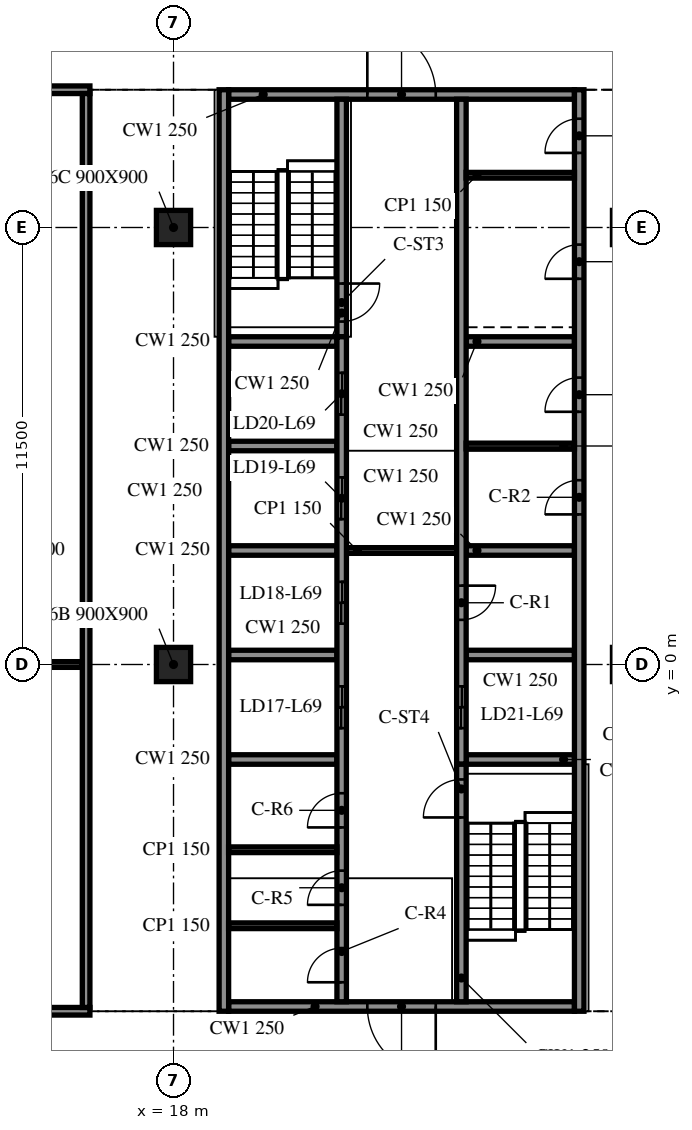
"""IFC4 building model, lengths in metres.
Left out: names, types, materials, properties, quantities, classifications, styles, units other than length and angle.
Written with IfcOpenShell. Run it as: python <this file> out.ifc"""

import sys

from ifc_helpers import new_model, si_unit, direction, frame, frame_2d, origin, origin_2d, place, context, subcontext, project, spatial, rectangle, extrude, element, fill, save


model = new_model("IFC4")
c1 = context("Model", 3, precision=1e-05, world=origin(), true_north=direction((0.0, 1.0)))
c2 = subcontext(c1, "Body", "Model", "MODEL_VIEW")
j1 = project(units=[si_unit("LENGTHUNIT", "METRE"), si_unit("PLANEANGLEUNIT", "RADIAN")], contexts=[c1])
p1 = place(None, origin())
s1 = spatial("IfcSite", under=j1, at=p1, CompositionType="ELEMENT")
p2 = place(p1, origin())
s2 = spatial("IfcBuilding", under=s1, at=p2, CompositionType="ELEMENT")
p3 = place(p2, frame((0.0, 0.0, 282.3)))
s3 = spatial("IfcBuildingStorey", under=s2, at=p3, CompositionType="ELEMENT", Elevation=282.3)
for number, where, z_axis, x_axis in (
    (1, (18.0, 0.0, -0.34), (0.0, 0.0, 1.0), (1.0, 0.0, 0.0)),
    (2, (18.0, 11.5, -0.34), (0.0, 0.0, 1.0), (1.0, 0.0, 0.0)),
):
    element("IfcColumn", number, at=place(p3, frame(where, z_axis=z_axis, x_axis=x_axis)), inside=s3, PredefinedType="COLUMN", context=c2, shape_type="SweptSolid", body=[
        extrude(rectangle(XDim=0.9, YDim=0.9, at=origin_2d()), origin(), (0.0, 0.0, 1.0), 7.34),
    ])
p4 = place(p3, frame((19.325, 15.125, 0.0), z_axis=(0.0, 0.0, 1.0), x_axis=(0.0, -1.0, 0.0)))
e3 = element("IfcWall", 3, at=p4, inside=s3, PredefinedType="SOLIDWALL", context=c2, shape_type="SweptSolid", body=[
    extrude(rectangle(XDim=24.25, YDim=0.25, at=frame_2d((12.125, 0.0))), origin(), (0.0, 0.0, 1.0), 3.46),
])
p5 = place(p3, frame((28.675, -9.125, 0.0), z_axis=(0.0, 0.0, 1.0), x_axis=(0.0, 1.0, 0.0)))
e4 = element("IfcWall", 4, at=p5, inside=s3, PredefinedType="SOLIDWALL", context=c2, shape_type="SweptSolid", body=[
    extrude(rectangle(XDim=24.25, YDim=0.25, at=frame_2d((12.125, 0.0))), origin(), (0.0, 0.0, 1.0), 3.46),
])
p6 = place(p5, frame((13.075, 0.0, 0.0)))
e5 = element("IfcOpeningElement", 5, at=p6, cuts=e4, PredefinedType="OPENING", context=c2, shape_type="SweptSolid", body=[
    extrude(rectangle(XDim=0.9, YDim=2.1, at=frame_2d((0.45, 1.05))), frame((0.0, 0.135, 0.0), z_axis=(0.0, -1.0, 0.0), x_axis=(1.0, 0.0, 0.0)), (0.0, 0.0, 1.0), 0.27),
])
p7 = place(p5, frame((15.775, 0.0, 0.0)))
e6 = element("IfcOpeningElement", 6, at=p7, cuts=e4, PredefinedType="OPENING", context=c2, shape_type="SweptSolid", body=[
    extrude(rectangle(XDim=0.9, YDim=2.1, at=frame_2d((0.45, 1.05))), frame((0.0, 0.135, 0.0), z_axis=(0.0, -1.0, 0.0), x_axis=(1.0, 0.0, 0.0)), (0.0, 0.0, 1.0), 0.27),
])
p8 = place(p5, frame((19.275, 0.0, 0.0)))
e7 = element("IfcOpeningElement", 7, at=p8, cuts=e4, PredefinedType="OPENING", context=c2, shape_type="SweptSolid", body=[
    extrude(rectangle(XDim=0.9, YDim=2.1, at=frame_2d((0.45, 1.05))), frame((0.0, 0.135, 0.0), z_axis=(0.0, -1.0, 0.0), x_axis=(1.0, 0.0, 0.0)), (0.0, 0.0, 1.0), 0.27),
])
p9 = place(p5, frame((22.587, 0.0, 0.0)))
e8 = element("IfcOpeningElement", 8, at=p9, cuts=e4, PredefinedType="OPENING", context=c2, shape_type="SweptSolid", body=[
    extrude(rectangle(XDim=0.9, YDim=2.1, at=frame_2d((0.45, 1.05))), frame((0.0, 0.135, 0.0), z_axis=(0.0, -1.0, 0.0), x_axis=(1.0, 0.0, 0.0)), (0.0, 0.0, 1.0), 0.27),
])
p10 = place(p3, frame((28.55, -9.0, 0.0), z_axis=(0.0, 0.0, 1.0), x_axis=(-1.0, 0.0, 0.0)))
e9 = element("IfcWall", 9, at=p10, inside=s3, PredefinedType="SOLIDWALL", context=c2, shape_type="SweptSolid", body=[
    extrude(rectangle(XDim=9.1, YDim=0.25, at=frame_2d((4.55, 0.0))), origin(), (0.0, 0.0, 1.0), 3.46),
])
p11 = place(p10, frame((3.65, 0.0, 0.0)))
e10 = element("IfcOpeningElement", 10, at=p11, cuts=e9, PredefinedType="OPENING", context=c2, shape_type="SweptSolid", body=[
    extrude(rectangle(XDim=1.8, YDim=2.1, at=frame_2d((0.9, 1.05))), frame((0.0, 0.135, 0.0), z_axis=(0.0, -1.0, 0.0), x_axis=(1.0, 0.0, 0.0)), (0.0, 0.0, 1.0), 0.27),
])
p12 = place(p3, frame((19.45, 15.0, 0.0), z_axis=(0.0, 0.0, 1.0), x_axis=(1.0, 0.0, 0.0)))
e11 = element("IfcWall", 11, at=p12, inside=s3, PredefinedType="SOLIDWALL", context=c2, shape_type="SweptSolid", body=[
    extrude(rectangle(XDim=9.1, YDim=0.25, at=frame_2d((4.55, 0.0))), origin(), (0.0, 0.0, 1.0), 3.46),
])
p13 = place(p12, frame((3.65, 0.0, 0.0)))
e12 = element("IfcOpeningElement", 12, at=p13, cuts=e11, PredefinedType="OPENING", context=c2, shape_type="SweptSolid", body=[
    extrude(rectangle(XDim=1.8, YDim=2.1, at=frame_2d((0.9, 1.05))), frame((0.0, 0.135, 0.0), z_axis=(0.0, -1.0, 0.0), x_axis=(1.0, 0.0, 0.0)), (0.0, 0.0, 1.0), 0.27),
])
p14 = place(p3, frame((22.425, -8.875, 0.0), z_axis=(0.0, 0.0, 1.0), x_axis=(0.0, 1.0, 0.0)))
e13 = element("IfcWall", 13, at=p14, inside=s3, PredefinedType="SOLIDWALL", context=c2, shape_type="SweptSolid", body=[
    extrude(rectangle(XDim=17.5, YDim=0.25, at=frame_2d((8.75, 0.0))), origin(), (0.0, 0.0, 1.0), 3.46),
])
p15 = place(p14, frame((7.2, 0.0, 0.0)))
e14 = element("IfcOpeningElement", 14, at=p15, cuts=e13, PredefinedType="OPENING", context=c2, shape_type="SweptSolid", body=[
    extrude(rectangle(XDim=1.1, YDim=2.1, at=frame_2d((0.55, 1.05))), frame((0.0, 0.135, 0.0), z_axis=(0.0, -1.0, 0.0), x_axis=(1.0, 0.0, 0.0)), (0.0, 0.0, 1.0), 0.27),
])
p16 = place(p14, frame((9.95, 0.0, 0.0)))
e15 = element("IfcOpeningElement", 15, at=p16, cuts=e13, PredefinedType="OPENING", context=c2, shape_type="SweptSolid", body=[
    extrude(rectangle(XDim=1.1, YDim=2.1, at=frame_2d((0.55, 1.05))), frame((0.0, 0.135, 0.0), z_axis=(0.0, -1.0, 0.0), x_axis=(1.0, 0.0, 0.0)), (0.0, 0.0, 1.0), 0.27),
])
p17 = place(p14, frame((12.7, 0.0, 0.0)))
e16 = element("IfcOpeningElement", 16, at=p17, cuts=e13, PredefinedType="OPENING", context=c2, shape_type="SweptSolid", body=[
    extrude(rectangle(XDim=1.1, YDim=2.1, at=frame_2d((0.55, 1.05))), frame((0.0, 0.135, 0.0), z_axis=(0.0, -1.0, 0.0), x_axis=(1.0, 0.0, 0.0)), (0.0, 0.0, 1.0), 0.27),
])
p18 = place(p14, frame((15.45, 0.0, 0.0)))
e17 = element("IfcOpeningElement", 17, at=p18, cuts=e13, PredefinedType="OPENING", context=c2, shape_type="SweptSolid", body=[
    extrude(rectangle(XDim=1.1, YDim=2.1, at=frame_2d((0.55, 1.05))), frame((0.0, 0.135, 0.0), z_axis=(0.0, -1.0, 0.0), x_axis=(1.0, 0.0, 0.0)), (0.0, 0.0, 1.0), 0.27),
])
p19 = place(p14, frame((0.512, 0.0, 0.0)))
e18 = element("IfcOpeningElement", 18, at=p19, cuts=e13, PredefinedType="OPENING", context=c2, shape_type="SweptSolid", body=[
    extrude(rectangle(XDim=0.9, YDim=2.1, at=frame_2d((0.45, 1.05))), frame((0.0, 0.135, 0.0), z_axis=(0.0, -1.0, 0.0), x_axis=(1.0, 0.0, 0.0)), (0.0, 0.0, 1.0), 0.27),
])
p20 = place(p14, frame((2.55, 0.0, 0.0)))
e19 = element("IfcOpeningElement", 19, at=p20, cuts=e13, PredefinedType="OPENING", context=c2, shape_type="SweptSolid", body=[
    extrude(rectangle(XDim=0.9, YDim=2.1, at=frame_2d((0.45, 1.05))), frame((0.0, 0.135, 0.0), z_axis=(0.0, -1.0, 0.0), x_axis=(1.0, 0.0, 0.0)), (0.0, 0.0, 1.0), 0.27),
])
p21 = place(p14, frame((4.587, 0.0, 0.0)))
e20 = element("IfcOpeningElement", 20, at=p21, cuts=e13, PredefinedType="OPENING", context=c2, shape_type="SweptSolid", body=[
    extrude(rectangle(XDim=0.9, YDim=2.1, at=frame_2d((0.45, 1.05))), frame((0.0, 0.135, 0.0), z_axis=(0.0, -1.0, 0.0), x_axis=(1.0, 0.0, 0.0)), (0.0, 0.0, 1.0), 0.27),
])
p22 = place(p3, frame((22.425, 14.875, 0.0), z_axis=(0.0, 0.0, 1.0), x_axis=(0.0, -1.0, 0.0)))
e21 = element("IfcWall", 21, at=p22, inside=s3, PredefinedType="SOLIDWALL", context=c2, shape_type="SweptSolid", body=[
    extrude(rectangle(XDim=6.25, YDim=0.25, at=frame_2d((3.125, 0.0))), origin(), (0.0, 0.0, 1.0), 3.46),
])
p23 = place(p22, frame((4.85, 0.0, 0.0)))
e22 = element("IfcOpeningElement", 22, at=p23, cuts=e21, PredefinedType="OPENING", context=c2, shape_type="SweptSolid", body=[
    extrude(rectangle(XDim=1.0, YDim=2.1, at=frame_2d((0.5, 1.05))), frame((0.0, 0.135, 0.0), z_axis=(0.0, -1.0, 0.0), x_axis=(1.0, 0.0, 0.0)), (0.0, 0.0, 1.0), 0.27),
])
p24 = place(p3, frame((25.575, -8.875, 0.0), z_axis=(0.0, 0.0, 1.0), x_axis=(0.0, 1.0, 0.0)))
e23 = element("IfcWall", 23, at=p24, inside=s3, PredefinedType="SOLIDWALL", context=c2, shape_type="SweptSolid", body=[
    extrude(rectangle(XDim=6.25, YDim=0.25, at=frame_2d((3.125, 0.0))), origin(), (0.0, 0.0, 1.0), 3.46),
])
p25 = place(p24, frame((4.85, 0.0, 0.0)))
e24 = element("IfcOpeningElement", 24, at=p25, cuts=e23, PredefinedType="OPENING", context=c2, shape_type="SweptSolid", body=[
    extrude(rectangle(XDim=1.0, YDim=2.1, at=frame_2d((0.5, 1.05))), frame((0.0, 0.135, 0.0), z_axis=(0.0, -1.0, 0.0), x_axis=(1.0, 0.0, 0.0)), (0.0, 0.0, 1.0), 0.27),
])
p26 = place(p3, frame((25.575, 14.875, 0.0), z_axis=(0.0, 0.0, 1.0), x_axis=(0.0, -1.0, 0.0)))
e25 = element("IfcWall", 25, at=p26, inside=s3, PredefinedType="SOLIDWALL", context=c2, shape_type="SweptSolid", body=[
    extrude(rectangle(XDim=17.5, YDim=0.25, at=frame_2d((8.75, 0.0))), origin(), (0.0, 0.0, 1.0), 3.46),
])
p27 = place(p26, frame((15.45, 0.0, 0.0)))
e26 = element("IfcOpeningElement", 26, at=p27, cuts=e25, PredefinedType="OPENING", context=c2, shape_type="SweptSolid", body=[
    extrude(rectangle(XDim=1.1, YDim=2.1, at=frame_2d((0.55, 1.05))), frame((0.0, 0.135, 0.0), z_axis=(0.0, -1.0, 0.0), x_axis=(1.0, 0.0, 0.0)), (0.0, 0.0, 1.0), 0.27),
])
p28 = place(p26, frame((12.8, 0.0, 0.0)))
e27 = element("IfcOpeningElement", 27, at=p28, cuts=e25, PredefinedType="OPENING", context=c2, shape_type="SweptSolid", body=[
    extrude(rectangle(XDim=0.9, YDim=2.1, at=frame_2d((0.45, 1.05))), frame((0.0, 0.135, 0.0), z_axis=(0.0, -1.0, 0.0), x_axis=(1.0, 0.0, 0.0)), (0.0, 0.0, 1.0), 0.27),
])
for number, where, z_axis, x_axis in (
    (28, (19.45, -2.5, 0.0), (0.0, 0.0, 1.0), (1.0, 0.0, 0.0)),
    (29, (19.45, 0.25, 0.0), (0.0, 0.0, 1.0), (1.0, 0.0, 0.0)),
    (30, (19.45, 3.0, 0.0), (0.0, 0.0, 1.0), (1.0, 0.0, 0.0)),
    (31, (19.45, 5.75, 0.0), (0.0, 0.0, 1.0), (1.0, 0.0, 0.0)),
    (32, (19.45, 8.5, 0.0), (0.0, 0.0, 1.0), (1.0, 0.0, 0.0)),
    (33, (25.7, -2.5, 0.0), (0.0, 0.0, 1.0), (1.0, 0.0, 0.0)),
    (34, (25.7, 0.25, 0.0), (0.0, 0.0, 1.0), (1.0, 0.0, 0.0)),
    (35, (25.7, 3.0, 0.0), (0.0, 0.0, 1.0), (1.0, 0.0, 0.0)),
    (36, (25.7, 8.5, 0.0), (0.0, 0.0, 1.0), (1.0, 0.0, 0.0)),
):
    element("IfcWall", number, at=place(p3, frame(where, z_axis=z_axis, x_axis=x_axis)), inside=s3, PredefinedType="SOLIDWALL", context=c2, shape_type="SweptSolid", body=[
        extrude(rectangle(XDim=2.85, YDim=0.25, at=frame_2d((1.425, 0.0))), origin(), (0.0, 0.0, 1.0), 3.46),
    ])
p29 = place(p3, frame((22.55, 3.0, 0.0), z_axis=(0.0, 0.0, 1.0), x_axis=(1.0, 0.0, 0.0)))
e37 = element("IfcWall", 37, at=p29, inside=s3, PredefinedType="PARTITIONING", context=c2, shape_type="SweptSolid", body=[
    extrude(rectangle(XDim=2.9, YDim=0.15, at=frame_2d((1.45, 0.0))), origin(), (0.0, 0.0, 1.0), 3.46),
])
for number, where, z_axis, x_axis in (
    (38, (25.7, 5.75, 0.0), (0.0, 0.0, 1.0), (1.0, 0.0, 0.0)),
    (39, (19.45, -6.875, 0.0), (0.0, 0.0, 1.0), (1.0, 0.0, 0.0)),
    (40, (19.45, -4.875, 0.0), (0.0, 0.0, 1.0), (1.0, 0.0, 0.0)),
    (41, (25.7, 12.875, 0.0), (0.0, 0.0, 1.0), (1.0, 0.0, 0.0)),
):
    element("IfcWall", number, at=place(p3, frame(where, z_axis=z_axis, x_axis=x_axis)), inside=s3, PredefinedType="PARTITIONING", context=c2, shape_type="SweptSolid", body=[
        extrude(rectangle(XDim=2.85, YDim=0.15, at=frame_2d((1.425, 0.0))), origin(), (0.0, 0.0, 1.0), 3.46),
    ])
p30 = place(p3, frame((8.1, -9.125, 0.0), z_axis=(0.0, 0.0, 1.0), x_axis=(1.0, 0.0, 0.0)))
e42 = element("IfcWall", 42, at=p30, inside=s3, PredefinedType="PARTITIONING", context=c2, shape_type="SweptSolid", body=[
    extrude(rectangle(XDim=7.7, YDim=0.2, at=frame_2d((3.85, 0.0))), origin(), (0.0, 0.0, 1.0), 3.4),
])
p31 = place(p30, frame((3.3, 0.0, 0.0)))
e43 = element("IfcOpeningElement", 43, at=p31, cuts=e42, PredefinedType="OPENING", context=c2, shape_type="SweptSolid", body=[
    extrude(rectangle(XDim=0.9, YDim=2.1, at=frame_2d((0.45, 1.05))), frame((0.0, 0.11, 0.0), z_axis=(0.0, -1.0, 0.0), x_axis=(1.0, 0.0, 0.0)), (0.0, 0.0, 1.0), 0.22),
])
p32 = place(p3, frame((8.3, 0.0, 0.0), z_axis=(0.0, 0.0, 1.0), x_axis=(1.0, 0.0, 0.0)))
e44 = element("IfcWall", 44, at=p32, inside=s3, PredefinedType="PARTITIONING", context=c2, shape_type="SweptSolid", body=[
    extrude(rectangle(XDim=7.3, YDim=0.15, at=frame_2d((3.65, 0.0))), origin(), (0.0, 0.0, 1.0), 3.4),
])
p33 = place(p3, frame((8.1, 15.125, 0.0), z_axis=(0.0, 0.0, 1.0), x_axis=(1.0, 0.0, 0.0)))
e45 = element("IfcWall", 45, at=p33, inside=s3, PredefinedType="PARTITIONING", context=c2, shape_type="SweptSolid", body=[
    extrude(rectangle(XDim=7.7, YDim=0.2, at=frame_2d((3.85, 0.0))), origin(), (0.0, 0.0, 1.0), 3.4),
])
p34 = place(p3, frame((15.7, -9.025, 0.0), z_axis=(0.0, 0.0, 1.0), x_axis=(0.0, 1.0, 0.0)))
e46 = element("IfcWall", 46, at=p34, inside=s3, PredefinedType="PARTITIONING", context=c2, shape_type="SweptSolid", body=[
    extrude(rectangle(XDim=24.05, YDim=0.2, at=frame_2d((12.025, 0.0))), origin(), (0.0, 0.0, 1.0), 3.4),
])
p35 = place(p11, origin())
e47 = element("IfcDoor", 47, at=p35, inside=s3, OperationType="DOUBLE_DOOR_SINGLE_SWING", PredefinedType="DOOR", context=c2, shape_type="SweptSolid", body=[
    extrude(rectangle(XDim=1.8, YDim=2.1, at=frame_2d((0.9, 1.05))), frame((0.0, 0.025, 0.0), z_axis=(0.0, -1.0, 0.0), x_axis=(1.0, 0.0, 0.0)), (0.0, 0.0, 1.0), 0.05),
])
fill(e10, e47)
p36 = place(p13, origin())
e48 = element("IfcDoor", 48, at=p36, inside=s3, OperationType="DOUBLE_DOOR_SINGLE_SWING", PredefinedType="DOOR", context=c2, shape_type="SweptSolid", body=[
    extrude(rectangle(XDim=1.8, YDim=2.1, at=frame_2d((0.9, 1.05))), frame((0.0, 0.025, 0.0), z_axis=(0.0, -1.0, 0.0), x_axis=(1.0, 0.0, 0.0)), (0.0, 0.0, 1.0), 0.05),
])
fill(e12, e48)
p37 = place(p27, origin())
e49 = element("IfcDoor", 49, at=p37, inside=s3, OperationType="DOUBLE_DOOR_SLIDING", PredefinedType="DOOR", context=c2, shape_type="SweptSolid", body=[
    extrude(rectangle(XDim=1.1, YDim=2.1, at=frame_2d((0.55, 1.05))), frame((0.0, 0.025, 0.0), z_axis=(0.0, -1.0, 0.0), x_axis=(1.0, 0.0, 0.0)), (0.0, 0.0, 1.0), 0.05),
])
fill(e26, e49)
p38 = place(p15, origin())
e50 = element("IfcDoor", 50, at=p38, inside=s3, OperationType="DOUBLE_DOOR_SLIDING", PredefinedType="DOOR", context=c2, shape_type="SweptSolid", body=[
    extrude(rectangle(XDim=1.1, YDim=2.1, at=frame_2d((0.55, 1.05))), frame((0.0, 0.025, 0.0), z_axis=(0.0, -1.0, 0.0), x_axis=(1.0, 0.0, 0.0)), (0.0, 0.0, 1.0), 0.05),
])
fill(e14, e50)
p39 = place(p16, origin())
e51 = element("IfcDoor", 51, at=p39, inside=s3, OperationType="DOUBLE_DOOR_SLIDING", PredefinedType="DOOR", context=c2, shape_type="SweptSolid", body=[
    extrude(rectangle(XDim=1.1, YDim=2.1, at=frame_2d((0.55, 1.05))), frame((0.0, 0.025, 0.0), z_axis=(0.0, -1.0, 0.0), x_axis=(1.0, 0.0, 0.0)), (0.0, 0.0, 1.0), 0.05),
])
fill(e15, e51)
p40 = place(p17, origin())
e52 = element("IfcDoor", 52, at=p40, inside=s3, OperationType="DOUBLE_DOOR_SLIDING", PredefinedType="DOOR", context=c2, shape_type="SweptSolid", body=[
    extrude(rectangle(XDim=1.1, YDim=2.1, at=frame_2d((0.55, 1.05))), frame((0.0, 0.025, 0.0), z_axis=(0.0, -1.0, 0.0), x_axis=(1.0, 0.0, 0.0)), (0.0, 0.0, 1.0), 0.05),
])
fill(e16, e52)
p41 = place(p18, origin())
e53 = element("IfcDoor", 53, at=p41, inside=s3, OperationType="DOUBLE_DOOR_SLIDING", PredefinedType="DOOR", context=c2, shape_type="SweptSolid", body=[
    extrude(rectangle(XDim=1.1, YDim=2.1, at=frame_2d((0.55, 1.05))), frame((0.0, 0.025, 0.0), z_axis=(0.0, -1.0, 0.0), x_axis=(1.0, 0.0, 0.0)), (0.0, 0.0, 1.0), 0.05),
])
fill(e17, e53)
p42 = place(p28, origin())
e54 = element("IfcDoor", 54, at=p42, inside=s3, OperationType="SINGLE_SWING_LEFT", PredefinedType="DOOR", context=c2, shape_type="SweptSolid", body=[
    extrude(rectangle(XDim=0.9, YDim=2.1, at=frame_2d((0.45, 1.05))), frame((0.0, 0.025, 0.0), z_axis=(0.0, -1.0, 0.0), x_axis=(1.0, 0.0, 0.0)), (0.0, 0.0, 1.0), 0.05),
])
fill(e27, e54)
p43 = place(p6, origin())
e55 = element("IfcDoor", 55, at=p43, inside=s3, OperationType="SINGLE_SWING_RIGHT", PredefinedType="DOOR", context=c2, shape_type="SweptSolid", body=[
    extrude(rectangle(XDim=0.9, YDim=2.1, at=frame_2d((0.45, 1.05))), frame((0.0, 0.025, 0.0), z_axis=(0.0, -1.0, 0.0), x_axis=(1.0, 0.0, 0.0)), (0.0, 0.0, 1.0), 0.05),
])
fill(e5, e55)
p44 = place(p7, origin())
e56 = element("IfcDoor", 56, at=p44, inside=s3, OperationType="SINGLE_SWING_LEFT", PredefinedType="DOOR", context=c2, shape_type="SweptSolid", body=[
    extrude(rectangle(XDim=0.9, YDim=2.1, at=frame_2d((0.45, 1.05))), frame((0.0, 0.025, 0.0), z_axis=(0.0, -1.0, 0.0), x_axis=(1.0, 0.0, 0.0)), (0.0, 0.0, 1.0), 0.05),
])
fill(e6, e56)
p45 = place(p19, origin())
e57 = element("IfcDoor", 57, at=p45, inside=s3, OperationType="SINGLE_SWING_RIGHT", PredefinedType="DOOR", context=c2, shape_type="SweptSolid", body=[
    extrude(rectangle(XDim=0.9, YDim=2.1, at=frame_2d((0.45, 1.05))), frame((0.0, 0.025, 0.0), z_axis=(0.0, -1.0, 0.0), x_axis=(1.0, 0.0, 0.0)), (0.0, 0.0, 1.0), 0.05),
])
fill(e18, e57)
p46 = place(p20, origin())
e58 = element("IfcDoor", 58, at=p46, inside=s3, OperationType="SINGLE_SWING_LEFT", PredefinedType="DOOR", context=c2, shape_type="SweptSolid", body=[
    extrude(rectangle(XDim=0.9, YDim=2.1, at=frame_2d((0.45, 1.05))), frame((0.0, 0.025, 0.0), z_axis=(0.0, -1.0, 0.0), x_axis=(1.0, 0.0, 0.0)), (0.0, 0.0, 1.0), 0.05),
])
fill(e19, e58)
p47 = place(p21, origin())
e59 = element("IfcDoor", 59, at=p47, inside=s3, OperationType="SINGLE_SWING_RIGHT", PredefinedType="DOOR", context=c2, shape_type="SweptSolid", body=[
    extrude(rectangle(XDim=0.9, YDim=2.1, at=frame_2d((0.45, 1.05))), frame((0.0, 0.025, 0.0), z_axis=(0.0, -1.0, 0.0), x_axis=(1.0, 0.0, 0.0)), (0.0, 0.0, 1.0), 0.05),
])
fill(e20, e59)
p48 = place(p8, origin())
e60 = element("IfcDoor", 60, at=p48, inside=s3, OperationType="SINGLE_SWING_LEFT", PredefinedType="DOOR", context=c2, shape_type="SweptSolid", body=[
    extrude(rectangle(XDim=0.9, YDim=2.1, at=frame_2d((0.45, 1.05))), frame((0.0, 0.025, 0.0), z_axis=(0.0, -1.0, 0.0), x_axis=(1.0, 0.0, 0.0)), (0.0, 0.0, 1.0), 0.05),
])
fill(e7, e60)
p49 = place(p9, origin())
e61 = element("IfcDoor", 61, at=p49, inside=s3, OperationType="SINGLE_SWING_RIGHT", PredefinedType="DOOR", context=c2, shape_type="SweptSolid", body=[
    extrude(rectangle(XDim=0.9, YDim=2.1, at=frame_2d((0.45, 1.05))), frame((0.0, 0.025, 0.0), z_axis=(0.0, -1.0, 0.0), x_axis=(1.0, 0.0, 0.0)), (0.0, 0.0, 1.0), 0.05),
])
fill(e8, e61)
p50 = place(p23, origin())
e62 = element("IfcDoor", 62, at=p50, inside=s3, OperationType="SINGLE_SWING_LEFT", PredefinedType="DOOR", context=c2, shape_type="SweptSolid", body=[
    extrude(rectangle(XDim=1.0, YDim=2.1, at=frame_2d((0.5, 1.05))), frame((0.0, 0.025, 0.0), z_axis=(0.0, -1.0, 0.0), x_axis=(1.0, 0.0, 0.0)), (0.0, 0.0, 1.0), 0.05),
])
fill(e22, e62)
p51 = place(p25, origin())
e63 = element("IfcDoor", 63, at=p51, inside=s3, OperationType="SINGLE_SWING_RIGHT", PredefinedType="DOOR", context=c2, shape_type="SweptSolid", body=[
    extrude(rectangle(XDim=1.0, YDim=2.1, at=frame_2d((0.5, 1.05))), frame((0.0, 0.025, 0.0), z_axis=(0.0, -1.0, 0.0), x_axis=(1.0, 0.0, 0.0)), (0.0, 0.0, 1.0), 0.05),
])
fill(e24, e63)
save(model, sys.argv[1])
